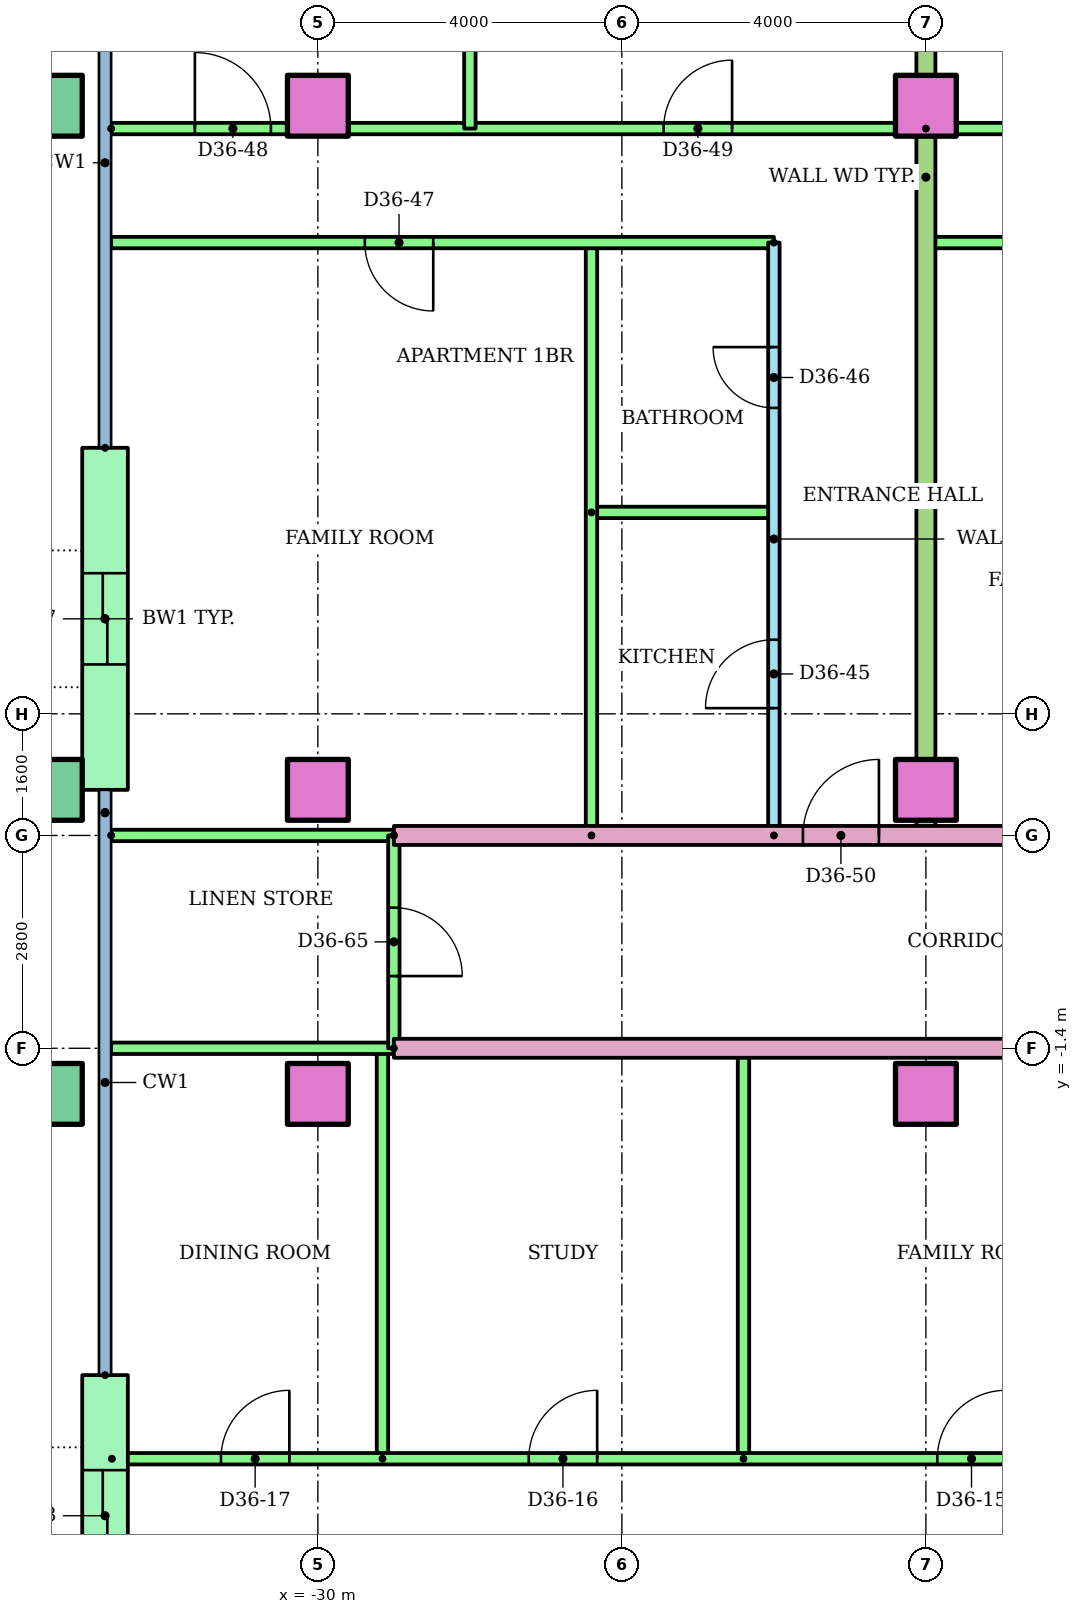
"""IFC4 building model, lengths in metres.
Left out: names, types, materials, properties, quantities, classifications, styles, units other than length and angle.
Written with IfcOpenShell. Run it as: python <this file> out.ifc"""

import sys

from ifc_helpers import new_model, si_unit, direction, frame, frame_2d, origin, origin_2d, place, context, subcontext, project, spatial, rectangle, hollow_rectangle, extrude, element, fill, save


model = new_model("IFC4")
c1 = context("Model", 3, precision=1e-05, world=origin(), true_north=direction((0.0, 1.0)))
c2 = subcontext(c1, "Body", "Model", "MODEL_VIEW")
j1 = project(units=[si_unit("LENGTHUNIT", "METRE"), si_unit("PLANEANGLEUNIT", "RADIAN")], contexts=[c1])
p1 = place(None, origin())
s1 = spatial("IfcSite", under=j1, at=p1, CompositionType="ELEMENT")
p2 = place(p1, origin())
s2 = spatial("IfcBuilding", under=s1, at=p2, CompositionType="ELEMENT")
p3 = place(p2, frame((0.0, 0.0, 139.0)))
s3 = spatial("IfcBuildingStorey", under=s2, at=p3, CompositionType="ELEMENT", Elevation=139.0)
p4 = place(p3, frame((-33.5, -2.0, 0.0)))
e1 = element("IfcColumn", 1, at=p4, inside=s3, PredefinedType="COLUMN", context=c2, shape_type="SweptSolid", body=[
    extrude(hollow_rectangle(XDim=0.8, YDim=0.8, WallThickness=0.04, at=origin_2d()), origin(), (0.0, 0.0, 1.0), 3.2),
])
for number, where in (
    (2, (-30.0, -2.0, 0.0)),
    (3, (-22.0, -2.0, 0.0)),
):
    element("IfcColumn", number, at=place(p3, frame(where)), inside=s3, PredefinedType="COLUMN", context=c2, shape_type="SweptSolid", body=[
        extrude(rectangle(XDim=0.8, YDim=0.8, at=origin_2d()), origin(), (0.0, 0.0, 1.0), 3.2),
    ])
p5 = place(p3, frame((-33.5, 2.0, 0.0)))
e4 = element("IfcColumn", 4, at=p5, inside=s3, PredefinedType="COLUMN", context=c2, shape_type="SweptSolid", body=[
    extrude(hollow_rectangle(XDim=0.8, YDim=0.8, WallThickness=0.04, at=origin_2d()), origin(), (0.0, 0.0, 1.0), 3.2),
])
for number, where in (
    (5, (-30.0, 2.0, 0.0)),
    (6, (-22.0, 2.0, 0.0)),
):
    element("IfcColumn", number, at=place(p3, frame(where)), inside=s3, PredefinedType="COLUMN", context=c2, shape_type="SweptSolid", body=[
        extrude(rectangle(XDim=0.8, YDim=0.8, at=origin_2d()), origin(), (0.0, 0.0, 1.0), 3.2),
    ])
p6 = place(p3, frame((-33.5, 11.0, 0.0)))
e7 = element("IfcColumn", 7, at=p6, inside=s3, PredefinedType="COLUMN", context=c2, shape_type="SweptSolid", body=[
    extrude(hollow_rectangle(XDim=0.8, YDim=0.8, WallThickness=0.04, at=origin_2d()), origin(), (0.0, 0.0, 1.0), 3.2),
])
for number, where in (
    (8, (-30.0, 11.0, 0.0)),
    (9, (-22.0, 11.0, 0.0)),
):
    element("IfcColumn", number, at=place(p3, frame(where)), inside=s3, PredefinedType="COLUMN", context=c2, shape_type="SweptSolid", body=[
        extrude(rectangle(XDim=0.8, YDim=0.8, at=origin_2d()), origin(), (0.0, 0.0, 1.0), 3.2),
    ])
p7 = place(p3, frame((-32.8, 6.5, 0.0), z_axis=(0.0, 0.0, 1.0), x_axis=(0.0, -1.0, 0.0)))
e10 = element("IfcWall", 10, at=p7, inside=s3, PredefinedType="STANDARD", context=c2, shape_type="SweptSolid", body=[
    extrude(rectangle(XDim=4.5, YDim=0.6, at=frame_2d((2.25, 0.0))), origin(), (0.0, 0.0, 1.0), 2.92),
])
p8 = place(p7, frame((1.65, 0.0, 0.0)))
e11 = element("IfcOpeningElement", 11, at=p8, cuts=e10, PredefinedType="OPENING", context=c2, shape_type="SweptSolid", body=[
    extrude(rectangle(XDim=1.2, YDim=2.1, at=frame_2d((0.6, 1.05))), frame((0.0, 0.31, 0.0), z_axis=(0.0, -1.0, 0.0), x_axis=(1.0, 0.0, 0.0)), (0.0, 0.0, 1.0), 0.62),
])
p9 = place(p3, frame((-32.8, -5.7, 0.0), z_axis=(0.0, 0.0, 1.0), x_axis=(0.0, -1.0, 0.0)))
e12 = element("IfcWall", 12, at=p9, inside=s3, PredefinedType="STANDARD", context=c2, shape_type="SweptSolid", body=[
    extrude(rectangle(XDim=3.7, YDim=0.6, at=frame_2d((1.85, 0.0))), origin(), (0.0, 0.0, 1.0), 2.92),
])
p10 = place(p9, frame((1.25, 0.0, 0.0)))
e13 = element("IfcOpeningElement", 13, at=p10, cuts=e12, PredefinedType="OPENING", context=c2, shape_type="SweptSolid", body=[
    extrude(rectangle(XDim=1.2, YDim=2.1, at=frame_2d((0.6, 1.05))), frame((0.0, 0.31, 0.0), z_axis=(0.0, -1.0, 0.0), x_axis=(1.0, 0.0, 0.0)), (0.0, 0.0, 1.0), 0.62),
])
for number, where, z_axis, x_axis in (
    (14, (-24.4, -6.8, 0.0), (0.0, 0.0, 1.0), (0.0, 1.0, 0.0)),
    (15, (-29.15, -6.8, 0.0), (0.0, 0.0, 1.0), (0.0, 1.0, 0.0)),
):
    element("IfcWall", number, at=place(p3, frame(where, z_axis=z_axis, x_axis=x_axis)), inside=s3, PredefinedType="PARTITIONING", context=c2, shape_type="SweptSolid", body=[
        extrude(rectangle(XDim=5.4, YDim=0.15, at=frame_2d((2.7, 0.0))), origin(), (0.0, 0.0, 1.0), 2.4),
    ])
p11 = place(p3, frame((-32.71, -6.8, 0.0)))
e16 = element("IfcWall", 16, at=p11, inside=s3, PredefinedType="PARTITIONING", context=c2, shape_type="SweptSolid", body=[
    extrude(rectangle(XDim=16.71, YDim=0.15, at=frame_2d((8.355, 0.0))), origin(), (0.0, 0.0, 1.0), 2.4),
])
p12 = place(p11, frame((10.86, 0.0, 0.0)))
e17 = element("IfcOpeningElement", 17, at=p12, cuts=e16, PredefinedType="OPENING", context=c2, shape_type="SweptSolid", body=[
    extrude(rectangle(XDim=0.9, YDim=2.1, at=frame_2d((0.45, 1.05))), frame((0.0, 0.085, 0.0), z_axis=(0.0, -1.0, 0.0), x_axis=(1.0, 0.0, 0.0)), (0.0, 0.0, 1.0), 0.17),
])
p13 = place(p11, frame((5.485, 0.0, 0.0)))
e18 = element("IfcOpeningElement", 18, at=p13, cuts=e16, PredefinedType="OPENING", context=c2, shape_type="SweptSolid", body=[
    extrude(rectangle(XDim=0.9, YDim=2.1, at=frame_2d((0.45, 1.05))), frame((0.0, 0.085, 0.0), z_axis=(0.0, -1.0, 0.0), x_axis=(1.0, 0.0, 0.0)), (0.0, 0.0, 1.0), 0.17),
])
p14 = place(p11, frame((1.435, 0.0, 0.0)))
e19 = element("IfcOpeningElement", 19, at=p14, cuts=e16, PredefinedType="OPENING", context=c2, shape_type="SweptSolid", body=[
    extrude(rectangle(XDim=0.9, YDim=2.1, at=frame_2d((0.45, 1.05))), frame((0.0, 0.085, 0.0), z_axis=(0.0, -1.0, 0.0), x_axis=(1.0, 0.0, 0.0)), (0.0, 0.0, 1.0), 0.17),
])
p15 = place(p3, frame((-14.0, -1.4, 0.0), z_axis=(0.0, 0.0, 1.0), x_axis=(-1.0, 0.0, 0.0)))
e20 = element("IfcWall", 20, at=p15, inside=s3, PredefinedType="PARTITIONING", context=c2, shape_type="SweptSolid", body=[
    extrude(rectangle(XDim=15.0, YDim=0.25, at=frame_2d((7.5, 0.0))), origin(), (0.0, 0.0, 1.0), 2.4),
])
p16 = place(p15, frame((0.618, 0.0, 0.0)))
e21 = element("IfcOpeningElement", 21, at=p16, cuts=e20, PredefinedType="OPENING", context=c2, shape_type="SweptSolid", body=[
    extrude(rectangle(XDim=1.0, YDim=2.1, at=frame_2d((0.5, 1.05))), frame((0.0, 0.135, 0.0), z_axis=(0.0, -1.0, 0.0), x_axis=(1.0, 0.0, 0.0)), (0.0, 0.0, 1.0), 0.27),
])
p17 = place(p3, frame((-29.0, -1.4, 0.0), z_axis=(0.0, 0.0, 1.0), x_axis=(-1.0, 0.0, 0.0)))
e22 = element("IfcWall", 22, at=p17, inside=s3, PredefinedType="PARTITIONING", context=c2, shape_type="SweptSolid", body=[
    extrude(rectangle(XDim=3.72, YDim=0.15, at=frame_2d((1.86, 0.0))), origin(), (0.0, 0.0, 1.0), 2.4),
])
p18 = place(p3, frame((-24.0, 1.4, 0.0), z_axis=(0.0, 0.0, 1.0), x_axis=(0.0, 1.0, 0.0)))
e23 = element("IfcWall", 23, at=p18, inside=s3, PredefinedType="PARTITIONING", context=c2, shape_type="SweptSolid", body=[
    extrude(rectangle(XDim=7.8, YDim=0.15, at=frame_2d((3.9, 0.0))), origin(), (0.0, 0.0, 1.0), 2.4),
])
p19 = place(p18, frame((1.675, 0.0, 0.0)))
e24 = element("IfcOpeningElement", 24, at=p19, cuts=e23, PredefinedType="OPENING", context=c2, shape_type="SweptSolid", body=[
    extrude(rectangle(XDim=0.9, YDim=2.1, at=frame_2d((0.45, 1.05))), frame((0.0, 0.085, 0.0), z_axis=(0.0, -1.0, 0.0), x_axis=(1.0, 0.0, 0.0)), (0.0, 0.0, 1.0), 0.17),
])
p20 = place(p18, frame((5.625, 0.0, 0.0)))
e25 = element("IfcOpeningElement", 25, at=p20, cuts=e23, PredefinedType="OPENING", context=c2, shape_type="SweptSolid", body=[
    extrude(rectangle(XDim=0.8, YDim=2.1, at=frame_2d((0.4, 1.05))), frame((0.0, 0.085, 0.0), z_axis=(0.0, -1.0, 0.0), x_axis=(1.0, 0.0, 0.0)), (0.0, 0.0, 1.0), 0.17),
])
p21 = place(p3, frame((-26.4, 5.65, 0.0)))
e26 = element("IfcWall", 26, at=p21, inside=s3, PredefinedType="PARTITIONING", context=c2, shape_type="SweptSolid", body=[
    extrude(rectangle(XDim=2.4, YDim=0.15, at=frame_2d((1.2, 0.0))), origin(), (0.0, 0.0, 1.0), 2.4),
])
p22 = place(p3, frame((-26.4, 1.4, 0.0), z_axis=(0.0, 0.0, 1.0), x_axis=(0.0, 1.0, 0.0)))
e27 = element("IfcWall", 27, at=p22, inside=s3, PredefinedType="PARTITIONING", context=c2, shape_type="SweptSolid", body=[
    extrude(rectangle(XDim=7.8, YDim=0.15, at=frame_2d((3.9, 0.0))), origin(), (0.0, 0.0, 1.0), 2.4),
])
p23 = place(p3, frame((-24.0, 9.2, 0.0), z_axis=(0.0, 0.0, 1.0), x_axis=(-1.0, 0.0, 0.0)))
e28 = element("IfcWall", 28, at=p23, inside=s3, PredefinedType="PARTITIONING", context=c2, shape_type="SweptSolid", body=[
    extrude(rectangle(XDim=8.72, YDim=0.15, at=frame_2d((4.36, 0.0))), origin(), (0.0, 0.0, 1.0), 2.4),
])
p24 = place(p23, frame((4.482, 0.0, 0.0)))
e29 = element("IfcOpeningElement", 29, at=p24, cuts=e28, PredefinedType="OPENING", context=c2, shape_type="SweptSolid", body=[
    extrude(rectangle(XDim=0.9, YDim=2.1, at=frame_2d((0.45, 1.05))), frame((0.0, 0.085, 0.0), z_axis=(0.0, -1.0, 0.0), x_axis=(1.0, 0.0, 0.0)), (0.0, 0.0, 1.0), 0.17),
])
p25 = place(p3, frame((-32.72, 10.7, 0.0)))
e30 = element("IfcWall", 30, at=p25, inside=s3, PredefinedType="PARTITIONING", context=c2, shape_type="SweptSolid", body=[
    extrude(rectangle(XDim=10.72, YDim=0.15, at=frame_2d((5.36, 0.0))), origin(), (0.0, 0.0, 1.0), 2.4),
])
p26 = place(p25, frame((1.102, 0.0, 0.0)))
e31 = element("IfcOpeningElement", 31, at=p26, cuts=e30, PredefinedType="OPENING", context=c2, shape_type="SweptSolid", body=[
    extrude(rectangle(XDim=1.0, YDim=2.1, at=frame_2d((0.5, 1.05))), frame((0.0, 0.085, 0.0), z_axis=(0.0, -1.0, 0.0), x_axis=(1.0, 0.0, 0.0)), (0.0, 0.0, 1.0), 0.17),
])
p27 = place(p25, frame((7.27, 0.0, 0.0)))
e32 = element("IfcOpeningElement", 32, at=p27, cuts=e30, PredefinedType="OPENING", context=c2, shape_type="SweptSolid", body=[
    extrude(rectangle(XDim=0.9, YDim=2.1, at=frame_2d((0.45, 1.05))), frame((0.0, 0.085, 0.0), z_axis=(0.0, -1.0, 0.0), x_axis=(1.0, 0.0, 0.0)), (0.0, 0.0, 1.0), 0.17),
])
p28 = place(p3, frame((-28.0, 16.92, 0.0), z_axis=(0.0, 0.0, 1.0), x_axis=(0.0, -1.0, 0.0)))
e33 = element("IfcWall", 33, at=p28, inside=s3, PredefinedType="PARTITIONING", context=c2, shape_type="SweptSolid", body=[
    extrude(rectangle(XDim=6.22, YDim=0.15, at=frame_2d((3.11, 0.0))), origin(), (0.0, 0.0, 1.0), 2.4),
])
p29 = place(p3, frame((-16.0, 9.2, 0.0), z_axis=(0.0, 0.0, 1.0), x_axis=(-1.0, 0.0, 0.0)))
e34 = element("IfcWall", 34, at=p29, inside=s3, PredefinedType="PARTITIONING", context=c2, shape_type="SweptSolid", body=[
    extrude(rectangle(XDim=6.0, YDim=0.15, at=frame_2d((3.0, 0.0))), origin(), (0.0, 0.0, 1.0), 2.4),
])
p30 = place(p29, frame((3.75, 0.0, 0.0)))
e35 = element("IfcOpeningElement", 35, at=p30, cuts=e34, PredefinedType="OPENING", context=c2, shape_type="SweptSolid", body=[
    extrude(rectangle(XDim=0.9, YDim=2.1, at=frame_2d((0.45, 1.05))), frame((0.0, 0.085, 0.0), z_axis=(0.0, -1.0, 0.0), x_axis=(1.0, 0.0, 0.0)), (0.0, 0.0, 1.0), 0.17),
])
p31 = place(p3, frame((-22.0, 10.7, 0.0)))
e36 = element("IfcWall", 36, at=p31, inside=s3, PredefinedType="PARTITIONING", context=c2, shape_type="SweptSolid", body=[
    extrude(rectangle(XDim=8.0, YDim=0.15, at=frame_2d((4.0, 0.0))), origin(), (0.0, 0.0, 1.0), 2.4),
])
p32 = place(p31, frame((3.5, 0.0, 0.0)))
e37 = element("IfcOpeningElement", 37, at=p32, cuts=e36, PredefinedType="OPENING", context=c2, shape_type="SweptSolid", body=[
    extrude(rectangle(XDim=1.0, YDim=2.1, at=frame_2d((0.5, 1.05))), frame((0.0, 0.085, 0.0), z_axis=(0.0, -1.0, 0.0), x_axis=(1.0, 0.0, 0.0)), (0.0, 0.0, 1.0), 0.17),
])
p33 = place(p3, frame((-22.0, 18.721, 0.0), z_axis=(0.0, 0.0, 1.0), x_axis=(0.0, -1.0, 0.0)))
e38 = element("IfcWall", 38, at=p33, inside=s3, PredefinedType="PARTITIONING", context=c2, shape_type="SweptSolid", body=[
    extrude(rectangle(XDim=17.321, YDim=0.25, at=frame_2d((8.661, 0.0))), origin(), (0.0, 0.0, 1.0), 2.4),
])
p34 = place(p3, frame((-29.0, 1.4, 0.0)))
e39 = element("IfcWall", 39, at=p34, inside=s3, PredefinedType="PARTITIONING", context=c2, shape_type="SweptSolid", body=[
    extrude(rectangle(XDim=15.0, YDim=0.25, at=frame_2d((7.5, 0.0))), origin(), (0.0, 0.0, 1.0), 2.4),
])
p35 = place(p34, frame((5.382, 0.0, 0.0)))
e40 = element("IfcOpeningElement", 40, at=p35, cuts=e39, PredefinedType="OPENING", context=c2, shape_type="SweptSolid", body=[
    extrude(rectangle(XDim=1.0, YDim=2.1, at=frame_2d((0.5, 1.05))), frame((0.0, 0.135, 0.0), z_axis=(0.0, -1.0, 0.0), x_axis=(1.0, 0.0, 0.0)), (0.0, 0.0, 1.0), 0.27),
])
p36 = place(p34, frame((13.5, 0.0, 0.0)))
e41 = element("IfcOpeningElement", 41, at=p36, cuts=e39, PredefinedType="OPENING", context=c2, shape_type="SweptSolid", body=[
    extrude(rectangle(XDim=1.0, YDim=2.1, at=frame_2d((0.5, 1.05))), frame((0.0, 0.135, 0.0), z_axis=(0.0, -1.0, 0.0), x_axis=(1.0, 0.0, 0.0)), (0.0, 0.0, 1.0), 0.27),
])
p37 = place(p3, frame((-32.72, 1.4, 0.0)))
e42 = element("IfcWall", 42, at=p37, inside=s3, PredefinedType="PARTITIONING", context=c2, shape_type="SweptSolid", body=[
    extrude(rectangle(XDim=3.72, YDim=0.15, at=frame_2d((1.86, 0.0))), origin(), (0.0, 0.0, 1.0), 2.4),
])
p38 = place(p3, frame((-29.0, 1.4, 0.0), z_axis=(0.0, 0.0, 1.0), x_axis=(0.0, -1.0, 0.0)))
e43 = element("IfcWall", 43, at=p38, inside=s3, PredefinedType="PARTITIONING", context=c2, shape_type="SweptSolid", body=[
    extrude(rectangle(XDim=2.8, YDim=0.15, at=frame_2d((1.4, 0.0))), origin(), (0.0, 0.0, 1.0), 2.4),
])
p39 = place(p38, frame((0.95, 0.0, 0.0)))
e44 = element("IfcOpeningElement", 44, at=p39, cuts=e43, PredefinedType="OPENING", context=c2, shape_type="SweptSolid", body=[
    extrude(rectangle(XDim=0.9, YDim=2.1, at=frame_2d((0.45, 1.05))), frame((0.0, 0.085, 0.0), z_axis=(0.0, -1.0, 0.0), x_axis=(1.0, 0.0, 0.0)), (0.0, 0.0, 1.0), 0.17),
])
p40 = place(p12, origin())
e45 = element("IfcDoor", 45, at=p40, inside=s3, OperationType="SINGLE_SWING_RIGHT", PredefinedType="DOOR", context=c2, shape_type="SweptSolid", body=[
    extrude(rectangle(XDim=0.9, YDim=2.1, at=frame_2d((0.45, 1.05))), frame((0.0, 0.025, 0.0), z_axis=(0.0, -1.0, 0.0), x_axis=(1.0, 0.0, 0.0)), (0.0, 0.0, 1.0), 0.05),
])
fill(e17, e45)
p41 = place(p13, origin())
e46 = element("IfcDoor", 46, at=p41, inside=s3, OperationType="SINGLE_SWING_RIGHT", PredefinedType="DOOR", context=c2, shape_type="SweptSolid", body=[
    extrude(rectangle(XDim=0.9, YDim=2.1, at=frame_2d((0.45, 1.05))), frame((0.0, 0.025, 0.0), z_axis=(0.0, -1.0, 0.0), x_axis=(1.0, 0.0, 0.0)), (0.0, 0.0, 1.0), 0.05),
])
fill(e18, e46)
p42 = place(p14, origin())
e47 = element("IfcDoor", 47, at=p42, inside=s3, OperationType="SINGLE_SWING_RIGHT", PredefinedType="DOOR", context=c2, shape_type="SweptSolid", body=[
    extrude(rectangle(XDim=0.9, YDim=2.1, at=frame_2d((0.45, 1.05))), frame((0.0, 0.025, 0.0), z_axis=(0.0, -1.0, 0.0), x_axis=(1.0, 0.0, 0.0)), (0.0, 0.0, 1.0), 0.05),
])
fill(e19, e47)
p43 = place(p19, origin())
e48 = element("IfcDoor", 48, at=p43, inside=s3, OperationType="SINGLE_SWING_LEFT", PredefinedType="DOOR", context=c2, shape_type="SweptSolid", body=[
    extrude(rectangle(XDim=0.9, YDim=2.1, at=frame_2d((0.45, 1.05))), frame((0.0, 0.025, 0.0), z_axis=(0.0, -1.0, 0.0), x_axis=(1.0, 0.0, 0.0)), (0.0, 0.0, 1.0), 0.05),
])
fill(e24, e48)
p44 = place(p20, origin())
e49 = element("IfcDoor", 49, at=p44, inside=s3, OperationType="SINGLE_SWING_RIGHT", PredefinedType="DOOR", context=c2, shape_type="SweptSolid", body=[
    extrude(rectangle(XDim=0.8, YDim=2.1, at=frame_2d((0.4, 1.05))), frame((0.0, 0.025, 0.0), z_axis=(0.0, -1.0, 0.0), x_axis=(1.0, 0.0, 0.0)), (0.0, 0.0, 1.0), 0.05),
])
fill(e25, e49)
p45 = place(p24, origin())
e50 = element("IfcDoor", 50, at=p45, inside=s3, OperationType="SINGLE_SWING_LEFT", PredefinedType="DOOR", context=c2, shape_type="SweptSolid", body=[
    extrude(rectangle(XDim=0.9, YDim=2.1, at=frame_2d((0.45, 1.05))), frame((0.0, 0.025, 0.0), z_axis=(0.0, -1.0, 0.0), x_axis=(1.0, 0.0, 0.0)), (0.0, 0.0, 1.0), 0.05),
])
fill(e29, e50)
p46 = place(p26, origin())
e51 = element("IfcDoor", 51, at=p46, inside=s3, OperationType="SINGLE_SWING_LEFT", PredefinedType="DOOR", context=c2, shape_type="SweptSolid", body=[
    extrude(rectangle(XDim=1.0, YDim=2.1, at=frame_2d((0.5, 1.05))), frame((0.0, 0.025, 0.0), z_axis=(0.0, -1.0, 0.0), x_axis=(1.0, 0.0, 0.0)), (0.0, 0.0, 1.0), 0.05),
])
fill(e31, e51)
p47 = place(p27, origin())
e52 = element("IfcDoor", 52, at=p47, inside=s3, OperationType="SINGLE_SWING_RIGHT", PredefinedType="DOOR", context=c2, shape_type="SweptSolid", body=[
    extrude(rectangle(XDim=0.9, YDim=2.1, at=frame_2d((0.45, 1.05))), frame((0.0, 0.025, 0.0), z_axis=(0.0, -1.0, 0.0), x_axis=(1.0, 0.0, 0.0)), (0.0, 0.0, 1.0), 0.05),
])
fill(e32, e52)
p48 = place(p35, origin())
e53 = element("IfcDoor", 53, at=p48, inside=s3, OperationType="SINGLE_SWING_RIGHT", PredefinedType="DOOR", context=c2, shape_type="SweptSolid", body=[
    extrude(rectangle(XDim=1.0, YDim=2.1, at=frame_2d((0.5, 1.05))), frame((0.0, 0.025, 0.0), z_axis=(0.0, -1.0, 0.0), x_axis=(1.0, 0.0, 0.0)), (0.0, 0.0, 1.0), 0.05),
])
fill(e40, e53)
p49 = place(p39, origin())
e54 = element("IfcDoor", 54, at=p49, inside=s3, OperationType="SINGLE_SWING_RIGHT", PredefinedType="DOOR", context=c2, shape_type="SweptSolid", body=[
    extrude(rectangle(XDim=0.9, YDim=2.1, at=frame_2d((0.45, 1.05))), frame((0.0, 0.025, 0.0), z_axis=(0.0, -1.0, 0.0), x_axis=(1.0, 0.0, 0.0)), (0.0, 0.0, 1.0), 0.05),
])
fill(e44, e54)
p50 = place(p8, origin())
e55 = element("IfcDoor", 55, at=p50, inside=s3, OperationType="SLIDING_TO_LEFT", PredefinedType="DOOR", context=c2, shape_type="SweptSolid", body=[
    extrude(rectangle(XDim=1.2, YDim=2.1, at=frame_2d((0.6, 1.05))), frame((0.0, 0.025, 0.0), z_axis=(0.0, -1.0, 0.0), x_axis=(1.0, 0.0, 0.0)), (0.0, 0.0, 1.0), 0.05),
])
fill(e11, e55)
p51 = place(p10, origin())
e56 = element("IfcDoor", 56, at=p51, inside=s3, OperationType="SLIDING_TO_LEFT", PredefinedType="DOOR", context=c2, shape_type="SweptSolid", body=[
    extrude(rectangle(XDim=1.2, YDim=2.1, at=frame_2d((0.6, 1.05))), frame((0.0, 0.025, 0.0), z_axis=(0.0, -1.0, 0.0), x_axis=(1.0, 0.0, 0.0)), (0.0, 0.0, 1.0), 0.05),
])
fill(e13, e56)
save(model, sys.argv[1])
